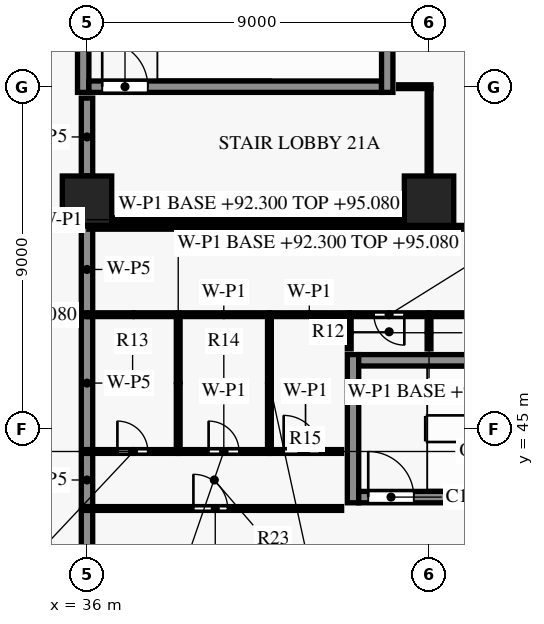
"""IFC4 building model, lengths in metres.
Left out: names, types, materials, properties, quantities, classifications, styles, units other than length and angle.
Written with IfcOpenShell. Run it as: python <this file> out.ifc"""

import sys

from ifc_helpers import new_model, si_unit, direction, frame, frame_2d, origin, origin_2d, place, context, subcontext, project, spatial, rectangle, extrude, element, fill, save


model = new_model("IFC4")
c1 = context("Model", 3, precision=1e-05, world=origin(), true_north=direction((0.0, 1.0)))
c2 = subcontext(c1, "Body", "Model", "MODEL_VIEW")
j1 = project(units=[si_unit("LENGTHUNIT", "METRE"), si_unit("PLANEANGLEUNIT", "RADIAN")], contexts=[c1])
p1 = place(None, origin())
s1 = spatial("IfcSite", under=j1, at=p1, CompositionType="ELEMENT")
p2 = place(p1, origin())
s2 = spatial("IfcBuilding", under=s1, at=p2, CompositionType="ELEMENT")
p3 = place(p2, frame((0.0, 0.0, 92.3)))
s3 = spatial("IfcBuildingStorey", under=s2, at=p3, CompositionType="ELEMENT", Elevation=92.3)
for number, where, z_axis, x_axis in (
    (1, (36.0, 51.0, 0.0), (0.0, 0.0, 1.0), (1.0, 0.0, 0.0)),
    (2, (45.0, 51.0, 0.0), (0.0, 0.0, 1.0), (1.0, 0.0, 0.0)),
):
    element("IfcColumn", number, at=place(p3, frame(where, z_axis=z_axis, x_axis=x_axis)), inside=s3, PredefinedType="COLUMN", context=c2, shape_type="SweptSolid", body=[
        extrude(rectangle(XDim=1.3, YDim=1.3, at=origin_2d()), origin(), (0.0, 0.0, 1.0), 3.8),
    ])
p4 = place(p3, frame((43.15, 43.2, 0.0), z_axis=(0.0, 0.0, 1.0), x_axis=(1.0, 0.0, 0.0)))
e3 = element("IfcWall", 3, at=p4, inside=s3, PredefinedType="SHEAR", context=c2, shape_type="SweptSolid", body=[
    extrude(rectangle(XDim=7.7, YDim=0.3, at=frame_2d((3.85, 0.0))), origin(), (0.0, 0.0, 1.0), 3.5),
])
p5 = place(p4, frame((0.25, 0.0, 0.0)))
e4 = element("IfcOpeningElement", 4, at=p5, cuts=e3, PredefinedType="OPENING", context=c2, shape_type="SweptSolid", body=[
    extrude(rectangle(XDim=1.2, YDim=2.2, at=frame_2d((0.6, 1.1))), frame((0.0, 0.16, 0.0), z_axis=(0.0, -1.0, 0.0), x_axis=(1.0, 0.0, 0.0)), (0.0, 0.0, 1.0), 0.32),
])
p6 = place(p3, frame((43.15, 46.8, 0.0), z_axis=(0.0, 0.0, 1.0), x_axis=(1.0, 0.0, 0.0)))
e5 = element("IfcWall", 5, at=p6, inside=s3, PredefinedType="SHEAR", context=c2, shape_type="SweptSolid", body=[
    extrude(rectangle(XDim=7.7, YDim=0.3, at=frame_2d((3.85, 0.0))), origin(), (0.0, 0.0, 1.0), 3.5),
])
p7 = place(p3, frame((36.05, 54.0, 0.0), z_axis=(0.0, 0.0, 1.0), x_axis=(1.0, 0.0, 0.0)))
e6 = element("IfcWall", 6, at=p7, inside=s3, PredefinedType="SHEAR", context=c2, shape_type="SweptSolid", body=[
    extrude(rectangle(XDim=7.7, YDim=0.3, at=frame_2d((3.85, 0.0))), origin(), (0.0, 0.0, 1.0), 3.5),
])
p8 = place(p7, frame((0.35, 0.0, 0.0)))
e7 = element("IfcOpeningElement", 7, at=p8, cuts=e6, PredefinedType="OPENING", context=c2, shape_type="SweptSolid", body=[
    extrude(rectangle(XDim=1.2, YDim=2.2, at=frame_2d((0.6, 1.1))), frame((0.0, 0.16, 0.0), z_axis=(0.0, -1.0, 0.0), x_axis=(1.0, 0.0, 0.0)), (0.0, 0.0, 1.0), 0.32),
])
for number, where, z_axis, x_axis in (
    (8, (35.9, 53.85, 0.0), (0.0, 0.0, 1.0), (0.0, 1.0, 0.0)),
    (9, (43.0, 43.05, 0.0), (0.0, 0.0, 1.0), (0.0, 1.0, 0.0)),
    (10, (43.9, 53.85, 0.0), (0.0, 0.0, 1.0), (0.0, 1.0, 0.0)),
):
    element("IfcWall", number, at=place(p3, frame(where, z_axis=z_axis, x_axis=x_axis)), inside=s3, PredefinedType="SHEAR", context=c2, shape_type="SweptSolid", body=[
        extrude(rectangle(XDim=3.9, YDim=0.3, at=frame_2d((1.95, 0.0))), origin(), (0.0, 0.0, 1.0), 3.5),
    ])
p9 = place(p3, frame((36.0, 39.67, 0.0), z_axis=(0.0, 0.0, 1.0), x_axis=(0.0, 1.0, 0.0)))
e11 = element("IfcWall", 11, at=p9, inside=s3, PredefinedType="PARTITIONING", context=c2, shape_type="SweptSolid", body=[
    extrude(rectangle(XDim=3.18, YDim=0.3, at=frame_2d((1.59, 0.0))), origin(), (0.0, 0.0, 1.0), 2.78),
])
p10 = place(p3, frame((36.05, 42.9, 0.0), z_axis=(0.0, 0.0, 1.0), x_axis=(1.0, 0.0, 0.0)))
e12 = element("IfcWall", 12, at=p10, inside=s3, PredefinedType="PARTITIONING", context=c2, shape_type="SweptSolid", body=[
    extrude(rectangle(XDim=6.65, YDim=0.1, at=frame_2d((3.325, 0.0))), origin(), (0.0, 0.0, 1.0), 2.78),
])
p11 = place(p10, frame((2.75, 0.0, 0.0)))
e13 = element("IfcOpeningElement", 13, at=p11, cuts=e12, PredefinedType="OPENING", context=c2, shape_type="SweptSolid", body=[
    extrude(rectangle(XDim=0.9, YDim=2.1, at=frame_2d((0.45, 1.05))), frame((0.0, 0.06, 0.0), z_axis=(0.0, -1.0, 0.0), x_axis=(1.0, 0.0, 0.0)), (0.0, 0.0, 1.0), 0.12),
])
p12 = place(p3, frame((36.0, 42.95, 0.0), z_axis=(0.0, 0.0, 1.0), x_axis=(0.0, 1.0, 0.0)))
e14 = element("IfcWall", 14, at=p12, inside=s3, PredefinedType="PARTITIONING", context=c2, shape_type="SweptSolid", body=[
    extrude(rectangle(XDim=1.4, YDim=0.3, at=frame_2d((0.7, 0.0))), origin(), (0.0, 0.0, 1.0), 2.78),
])
p13 = place(p3, frame((36.05, 44.4, 0.0), z_axis=(0.0, 0.0, 1.0), x_axis=(1.0, 0.0, 0.0)))
e15 = element("IfcWall", 15, at=p13, inside=s3, PredefinedType="PARTITIONING", context=c2, shape_type="SweptSolid", body=[
    extrude(rectangle(XDim=2.35, YDim=0.1, at=frame_2d((1.175, 0.0))), origin(), (0.0, 0.0, 1.0), 2.78),
])
p14 = place(p13, frame((0.75, 0.0, 0.0)))
e16 = element("IfcOpeningElement", 16, at=p14, cuts=e15, PredefinedType="OPENING", context=c2, shape_type="SweptSolid", body=[
    extrude(rectangle(XDim=0.8, YDim=2.1, at=frame_2d((0.4, 1.05))), frame((0.0, 0.06, 0.0), z_axis=(0.0, -1.0, 0.0), x_axis=(1.0, 0.0, 0.0)), (0.0, 0.0, 1.0), 0.12),
])
p15 = place(p3, frame((38.4, 44.4, 0.0), z_axis=(0.0, 0.0, 1.0), x_axis=(1.0, 0.0, 0.0)))
e17 = element("IfcWall", 17, at=p15, inside=s3, PredefinedType="PARTITIONING", context=c2, shape_type="SweptSolid", body=[
    extrude(rectangle(XDim=2.4, YDim=0.1, at=frame_2d((1.2, 0.0))), origin(), (0.0, 0.0, 1.0), 3.48),
])
p16 = place(p15, frame((0.8, 0.0, 0.0)))
e18 = element("IfcOpeningElement", 18, at=p16, cuts=e17, PredefinedType="OPENING", context=c2, shape_type="SweptSolid", body=[
    extrude(rectangle(XDim=0.8, YDim=2.1, at=frame_2d((0.4, 1.05))), frame((0.0, 0.06, 0.0), z_axis=(0.0, -1.0, 0.0), x_axis=(1.0, 0.0, 0.0)), (0.0, 0.0, 1.0), 0.12),
])
p17 = place(p3, frame((40.8, 44.4, 0.0), z_axis=(0.0, 0.0, 1.0), x_axis=(1.0, 0.0, 0.0)))
e19 = element("IfcWall", 19, at=p17, inside=s3, PredefinedType="PARTITIONING", context=c2, shape_type="SweptSolid", body=[
    extrude(rectangle(XDim=1.9, YDim=0.1, at=frame_2d((0.95, 0.0))), origin(), (0.0, 0.0, 1.0), 3.48),
])
p18 = place(p17, frame((0.375, 0.0, 0.0)))
e20 = element("IfcOpeningElement", 20, at=p18, cuts=e19, PredefinedType="OPENING", context=c2, shape_type="SweptSolid", body=[
    extrude(rectangle(XDim=0.95, YDim=2.1, at=frame_2d((0.475, 1.05))), frame((0.0, 0.06, 0.0), z_axis=(0.0, -1.0, 0.0), x_axis=(1.0, 0.0, 0.0)), (0.0, 0.0, 1.0), 0.12),
])
p19 = place(p3, frame((36.0, 44.45, 0.0), z_axis=(0.0, 0.0, 1.0), x_axis=(0.0, 1.0, 0.0)))
e21 = element("IfcWall", 21, at=p19, inside=s3, PredefinedType="PARTITIONING", context=c2, shape_type="SweptSolid", body=[
    extrude(rectangle(XDim=3.5, YDim=0.3, at=frame_2d((1.75, 0.0))), origin(), (0.0, 0.0, 1.0), 2.78),
])
for number, where, z_axis, x_axis in (
    (22, (38.4, 47.95, 0.0), (0.0, 0.0, 1.0), (0.0, -1.0, 0.0)),
    (23, (40.8, 47.95, 0.0), (0.0, 0.0, 1.0), (0.0, -1.0, 0.0)),
):
    element("IfcWall", number, at=place(p3, frame(where, z_axis=z_axis, x_axis=x_axis)), inside=s3, PredefinedType="PARTITIONING", context=c2, shape_type="SweptSolid", body=[
        extrude(rectangle(XDim=3.5, YDim=0.1, at=frame_2d((1.75, 0.0))), origin(), (0.0, 0.0, 1.0), 2.78),
    ])
for number, where, z_axis, x_axis in (
    (24, (42.9, 47.95, 0.0), (0.0, 0.0, 1.0), (0.0, -1.0, 0.0)),
    (25, (45.0, 47.95, 0.0), (0.0, 0.0, 1.0), (0.0, -1.0, 0.0)),
):
    element("IfcWall", number, at=place(p3, frame(where, z_axis=z_axis, x_axis=x_axis)), inside=s3, PredefinedType="PARTITIONING", context=c2, shape_type="SweptSolid", body=[
        extrude(rectangle(XDim=0.85, YDim=0.1, at=frame_2d((0.425, 0.0))), origin(), (0.0, 0.0, 1.0), 2.78),
    ])
p20 = place(p3, frame((38.4, 48.0, 0.0), z_axis=(0.0, 0.0, 1.0), x_axis=(-1.0, 0.0, 0.0)))
e26 = element("IfcWall", 26, at=p20, inside=s3, PredefinedType="PARTITIONING", context=c2, shape_type="SweptSolid", body=[
    extrude(rectangle(XDim=2.35, YDim=0.1, at=frame_2d((1.175, 0.0))), origin(), (0.0, 0.0, 1.0), 2.78),
])
p21 = place(p3, frame((40.8, 48.0, 0.0), z_axis=(0.0, 0.0, 1.0), x_axis=(-1.0, 0.0, 0.0)))
e27 = element("IfcWall", 27, at=p21, inside=s3, PredefinedType="PARTITIONING", context=c2, shape_type="SweptSolid", body=[
    extrude(rectangle(XDim=2.4, YDim=0.1, at=frame_2d((1.2, 0.0))), origin(), (0.0, 0.0, 1.0), 3.48),
])
p22 = place(p3, frame((42.9, 48.0, 0.0), z_axis=(0.0, 0.0, 1.0), x_axis=(-1.0, 0.0, 0.0)))
e28 = element("IfcWall", 28, at=p22, inside=s3, PredefinedType="PARTITIONING", context=c2, shape_type="SweptSolid", body=[
    extrude(rectangle(XDim=2.1, YDim=0.1, at=frame_2d((1.05, 0.0))), origin(), (0.0, 0.0, 1.0), 3.48),
])
p23 = place(p3, frame((45.0, 48.0, 0.0), z_axis=(0.0, 0.0, 1.0), x_axis=(-1.0, 0.0, 0.0)))
e29 = element("IfcWall", 29, at=p23, inside=s3, PredefinedType="PARTITIONING", context=c2, shape_type="SweptSolid", body=[
    extrude(rectangle(XDim=2.1, YDim=0.1, at=frame_2d((1.05, 0.0))), origin(), (0.0, 0.0, 1.0), 2.88),
])
p24 = place(p23, frame((0.65, 0.0, 0.0)))
e30 = element("IfcOpeningElement", 30, at=p24, cuts=e29, PredefinedType="OPENING", context=c2, shape_type="SweptSolid", body=[
    extrude(rectangle(XDim=0.8, YDim=2.1, at=frame_2d((0.4, 1.05))), frame((0.0, 0.06, 0.0), z_axis=(0.0, -1.0, 0.0), x_axis=(1.0, 0.0, 0.0)), (0.0, 0.0, 1.0), 0.12),
])
p25 = place(p3, frame((54.0, 48.0, 0.0), z_axis=(0.0, 0.0, 1.0), x_axis=(-1.0, 0.0, 0.0)))
e31 = element("IfcWall", 31, at=p25, inside=s3, PredefinedType="PARTITIONING", context=c2, shape_type="SweptSolid", body=[
    extrude(rectangle(XDim=9.0, YDim=0.1, at=frame_2d((4.5, 0.0))), origin(), (0.0, 0.0, 1.0), 2.88),
])
p26 = place(p3, frame((36.0, 48.05, 0.0), z_axis=(0.0, 0.0, 1.0), x_axis=(0.0, 1.0, 0.0)))
e32 = element("IfcWall", 32, at=p26, inside=s3, PredefinedType="PARTITIONING", context=c2, shape_type="SweptSolid", body=[
    extrude(rectangle(XDim=2.28, YDim=0.3, at=frame_2d((1.14, 0.0))), origin(), (0.0, 0.0, 1.0), 2.78),
])
p27 = place(p3, frame((36.05, 50.3, 0.0), z_axis=(0.0, 0.0, 1.0), x_axis=(1.0, 0.0, 0.0)))
e33 = element("IfcWall", 33, at=p27, inside=s3, PredefinedType="PARTITIONING", context=c2, shape_type="SweptSolid", body=[
    extrude(rectangle(XDim=8.95, YDim=0.1, at=frame_2d((4.475, 0.0))), origin(), (0.0, 0.0, 1.0), 2.78),
])
p28 = place(p3, frame((45.0, 50.3, 0.0), z_axis=(0.0, 0.0, 1.0), x_axis=(1.0, 0.0, 0.0)))
e34 = element("IfcWall", 34, at=p28, inside=s3, PredefinedType="PARTITIONING", context=c2, shape_type="SweptSolid", body=[
    extrude(rectangle(XDim=13.5, YDim=0.1, at=frame_2d((6.75, 0.0))), origin(), (0.0, 0.0, 1.0), 2.88),
])
p29 = place(p28, frame((4.05, 0.0, 0.0)))
e35 = element("IfcOpeningElement", 35, at=p29, cuts=e34, PredefinedType="OPENING", context=c2, shape_type="SweptSolid", body=[
    extrude(rectangle(XDim=0.9, YDim=2.1, at=frame_2d((0.45, 1.05))), frame((0.0, 0.06, 0.0), z_axis=(0.0, -1.0, 0.0), x_axis=(1.0, 0.0, 0.0)), (0.0, 0.0, 1.0), 0.12),
])
p30 = place(p3, frame((44.345, 50.5, 0.0), z_axis=(0.0, 0.0, 1.0), x_axis=(-1.0, 0.0, 0.0)))
e36 = element("IfcWall", 36, at=p30, inside=s3, PredefinedType="PARTITIONING", context=c2, shape_type="SweptSolid", body=[
    extrude(rectangle(XDim=7.69, YDim=0.1, at=frame_2d((3.845, 0.0))), origin(), (0.0, 0.0, 1.0), 3.48),
])
p31 = place(p3, frame((36.0, 51.655, 0.0), z_axis=(0.0, 0.0, 1.0), x_axis=(0.0, 1.0, 0.0)))
e37 = element("IfcWall", 37, at=p31, inside=s3, PredefinedType="PARTITIONING", context=c2, shape_type="SweptSolid", body=[
    extrude(rectangle(XDim=2.045, YDim=0.3, at=frame_2d((1.022, 0.0))), origin(), (0.0, 0.0, 1.0), 2.78),
])
p32 = place(p3, frame((45.0, 53.95, 0.0), z_axis=(0.0, 0.0, 1.0), x_axis=(0.0, -1.0, 0.0)))
e38 = element("IfcWall", 38, at=p32, inside=s3, PredefinedType="PARTITIONING", context=c2, shape_type="SweptSolid", body=[
    extrude(rectangle(XDim=2.295, YDim=0.1, at=frame_2d((1.147, 0.0))), origin(), (0.0, 0.0, 1.0), 2.88),
])
p33 = place(p3, frame((44.2, 54.0, 0.0), z_axis=(0.0, 0.0, 1.0), x_axis=(1.0, 0.0, 0.0)))
e39 = element("IfcWall", 39, at=p33, inside=s3, PredefinedType="PARTITIONING", context=c2, shape_type="SweptSolid", body=[
    extrude(rectangle(XDim=0.85, YDim=0.1, at=frame_2d((0.425, 0.0))), origin(), (0.0, 0.0, 1.0), 2.88),
])
p34 = place(p8, origin())
e40 = element("IfcDoor", 40, at=p34, inside=s3, OperationType="SINGLE_SWING_LEFT", PredefinedType="DOOR", context=c2, shape_type="SweptSolid", body=[
    extrude(rectangle(XDim=1.2, YDim=2.2, at=frame_2d((0.6, 1.1))), frame((0.0, 0.025, 0.0), z_axis=(0.0, -1.0, 0.0), x_axis=(1.0, 0.0, 0.0)), (0.0, 0.0, 1.0), 0.05),
])
fill(e7, e40)
p35 = place(p5, origin())
e41 = element("IfcDoor", 41, at=p35, inside=s3, OperationType="SINGLE_SWING_RIGHT", PredefinedType="DOOR", context=c2, shape_type="SweptSolid", body=[
    extrude(rectangle(XDim=1.2, YDim=2.2, at=frame_2d((0.6, 1.1))), frame((0.0, 0.025, 0.0), z_axis=(0.0, -1.0, 0.0), x_axis=(1.0, 0.0, 0.0)), (0.0, 0.0, 1.0), 0.05),
])
fill(e4, e41)
p36 = place(p11, origin())
e42 = element("IfcDoor", 42, at=p36, inside=s3, OperationType="SINGLE_SWING_LEFT", PredefinedType="DOOR", context=c2, shape_type="SweptSolid", body=[
    extrude(rectangle(XDim=0.9, YDim=2.1, at=frame_2d((0.45, 1.05))), frame((0.0, 0.025, 0.0), z_axis=(0.0, -1.0, 0.0), x_axis=(1.0, 0.0, 0.0)), (0.0, 0.0, 1.0), 0.05),
])
fill(e13, e42)
p37 = place(p14, origin())
e43 = element("IfcDoor", 43, at=p37, inside=s3, OperationType="SINGLE_SWING_LEFT", PredefinedType="DOOR", context=c2, shape_type="SweptSolid", body=[
    extrude(rectangle(XDim=0.8, YDim=2.1, at=frame_2d((0.4, 1.05))), frame((0.0, 0.025, 0.0), z_axis=(0.0, -1.0, 0.0), x_axis=(1.0, 0.0, 0.0)), (0.0, 0.0, 1.0), 0.05),
])
fill(e16, e43)
p38 = place(p16, origin())
e44 = element("IfcDoor", 44, at=p38, inside=s3, OperationType="SINGLE_SWING_RIGHT", PredefinedType="DOOR", context=c2, shape_type="SweptSolid", body=[
    extrude(rectangle(XDim=0.8, YDim=2.1, at=frame_2d((0.4, 1.05))), frame((0.0, 0.025, 0.0), z_axis=(0.0, -1.0, 0.0), x_axis=(1.0, 0.0, 0.0)), (0.0, 0.0, 1.0), 0.05),
])
fill(e18, e44)
p39 = place(p18, origin())
e45 = element("IfcDoor", 45, at=p39, inside=s3, OperationType="SINGLE_SWING_LEFT", PredefinedType="DOOR", context=c2, shape_type="SweptSolid", body=[
    extrude(rectangle(XDim=0.95, YDim=2.1, at=frame_2d((0.475, 1.05))), frame((0.0, 0.025, 0.0), z_axis=(0.0, -1.0, 0.0), x_axis=(1.0, 0.0, 0.0)), (0.0, 0.0, 1.0), 0.05),
])
fill(e20, e45)
p40 = place(p24, origin())
e46 = element("IfcDoor", 46, at=p40, inside=s3, OperationType="SINGLE_SWING_LEFT", PredefinedType="DOOR", context=c2, shape_type="SweptSolid", body=[
    extrude(rectangle(XDim=0.8, YDim=2.1, at=frame_2d((0.4, 1.05))), frame((0.0, 0.025, 0.0), z_axis=(0.0, -1.0, 0.0), x_axis=(1.0, 0.0, 0.0)), (0.0, 0.0, 1.0), 0.05),
])
fill(e30, e46)
save(model, sys.argv[1])
